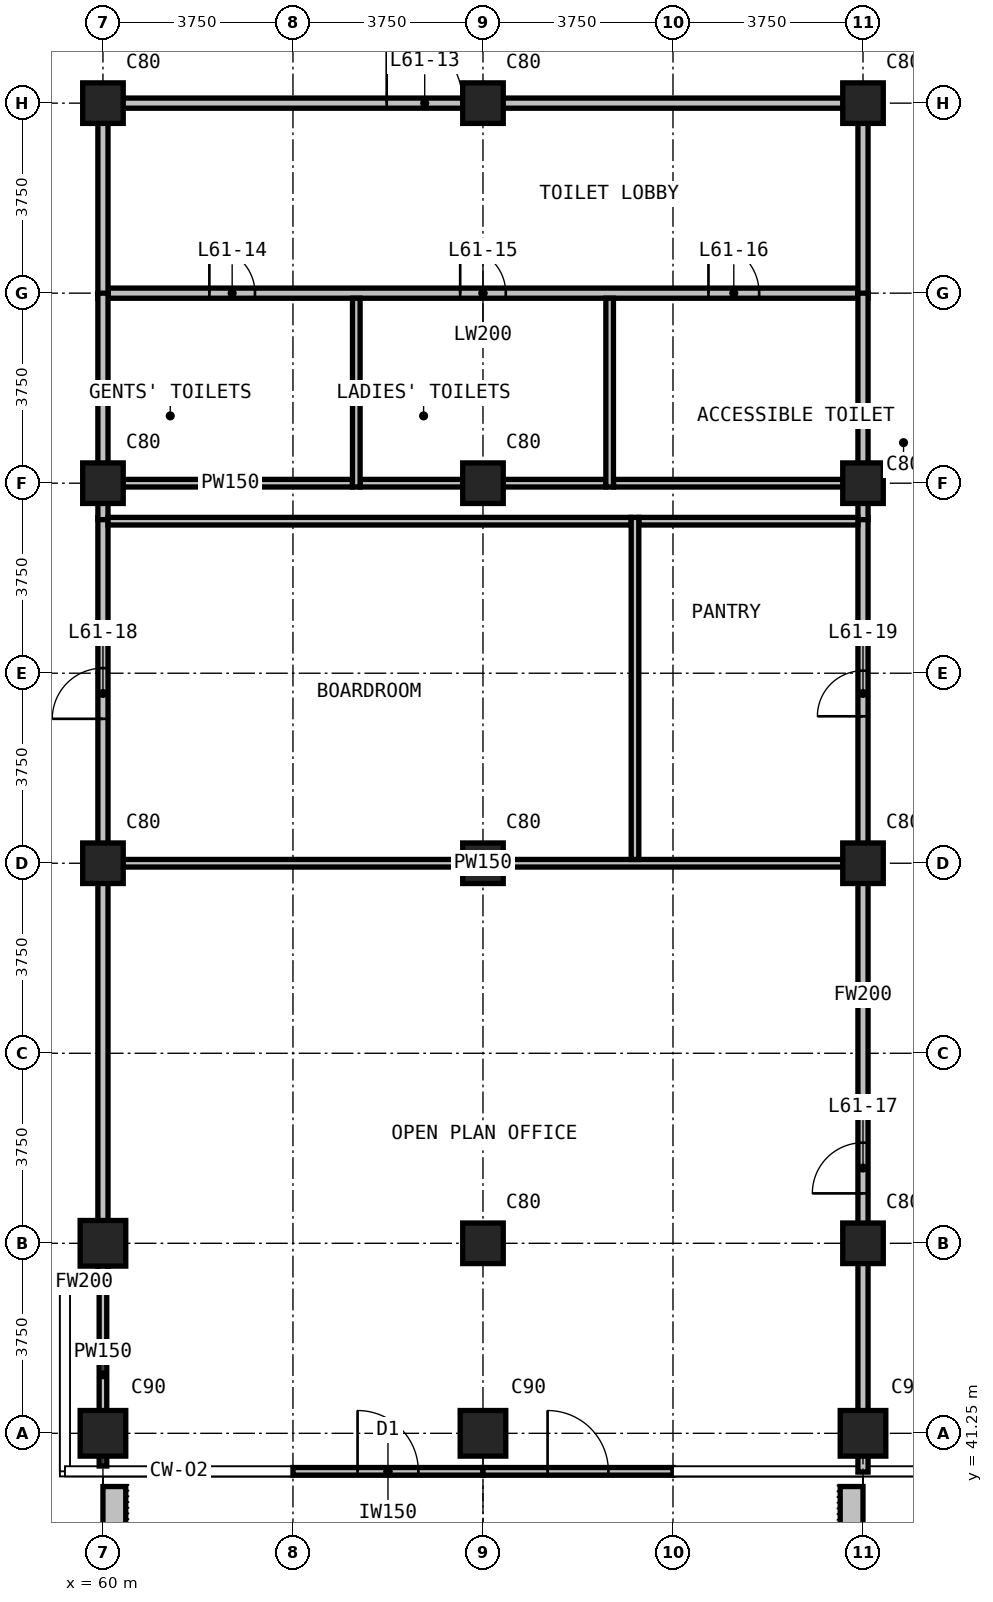
"""IFC4 building model, lengths in metres.
Left out: names, types, materials, properties, quantities, classifications, styles, units other than length and angle.
Written with IfcOpenShell. Run it as: python <this file> out.ifc"""

import sys

from ifc_helpers import new_model, si_unit, direction, frame, frame_2d, origin, origin_2d, place, context, subcontext, project, spatial, rectangle, extrude, element, fill, save


model = new_model("IFC4")
c1 = context("Model", 3, precision=1e-05, world=origin(), true_north=direction((0.0, 1.0)))
c2 = subcontext(c1, "Body", "Model", "MODEL_VIEW")
j1 = project(units=[si_unit("LENGTHUNIT", "METRE"), si_unit("PLANEANGLEUNIT", "RADIAN")], contexts=[c1])
p1 = place(None, origin())
s1 = spatial("IfcSite", under=j1, at=p1, CompositionType="ELEMENT")
p2 = place(p1, origin())
s2 = spatial("IfcBuilding", under=s1, at=p2, CompositionType="ELEMENT")
p3 = place(p2, frame((0.0, 0.0, 235.5)))
s3 = spatial("IfcBuildingStorey", under=s2, at=p3, CompositionType="ELEMENT", Elevation=235.5)
for number, where, z_axis, x_axis in (
    (1, (60.0, 41.25, 0.0), (0.0, 0.0, 1.0), (1.0, 0.0, 0.0)),
    (2, (60.0, 45.0, 0.0), (0.0, 0.0, 1.0), (1.0, 0.0, 0.0)),
):
    element("IfcColumn", number, at=place(p3, frame(where, z_axis=z_axis, x_axis=x_axis)), inside=s3, PredefinedType="COLUMN", context=c2, shape_type="SweptSolid", body=[
        extrude(rectangle(XDim=0.9, YDim=0.9, at=origin_2d()), origin(), (0.0, 0.0, 1.0), 3.6),
    ])
for number, where, z_axis, x_axis in (
    (3, (60.0, 52.5, 0.0), (0.0, 0.0, 1.0), (1.0, 0.0, 0.0)),
    (4, (60.0, 60.0, 0.0), (0.0, 0.0, 1.0), (1.0, 0.0, 0.0)),
    (5, (60.0, 67.5, 0.0), (0.0, 0.0, 1.0), (1.0, 0.0, 0.0)),
):
    element("IfcColumn", number, at=place(p3, frame(where, z_axis=z_axis, x_axis=x_axis)), inside=s3, PredefinedType="COLUMN", context=c2, shape_type="SweptSolid", body=[
        extrude(rectangle(XDim=0.8, YDim=0.8, at=origin_2d()), origin(), (0.0, 0.0, 1.0), 3.6),
    ])
p4 = place(p3, frame((67.5, 41.25, 0.0), z_axis=(0.0, 0.0, 1.0), x_axis=(1.0, 0.0, 0.0)))
e6 = element("IfcColumn", 6, at=p4, inside=s3, PredefinedType="COLUMN", context=c2, shape_type="SweptSolid", body=[
    extrude(rectangle(XDim=0.9, YDim=0.9, at=origin_2d()), origin(), (0.0, 0.0, 1.0), 3.6),
])
for number, where, z_axis, x_axis in (
    (7, (67.5, 45.0, 0.0), (0.0, 0.0, 1.0), (1.0, 0.0, 0.0)),
    (8, (67.5, 52.5, 0.0), (0.0, 0.0, 1.0), (1.0, 0.0, 0.0)),
    (9, (67.5, 60.0, 0.0), (0.0, 0.0, 1.0), (1.0, 0.0, 0.0)),
    (10, (67.5, 67.5, 0.0), (0.0, 0.0, 1.0), (1.0, 0.0, 0.0)),
):
    element("IfcColumn", number, at=place(p3, frame(where, z_axis=z_axis, x_axis=x_axis)), inside=s3, PredefinedType="COLUMN", context=c2, shape_type="SweptSolid", body=[
        extrude(rectangle(XDim=0.8, YDim=0.8, at=origin_2d()), origin(), (0.0, 0.0, 1.0), 3.6),
    ])
p5 = place(p3, frame((75.0, 41.25, 0.0), z_axis=(0.0, 0.0, 1.0), x_axis=(1.0, 0.0, 0.0)))
e11 = element("IfcColumn", 11, at=p5, inside=s3, PredefinedType="COLUMN", context=c2, shape_type="SweptSolid", body=[
    extrude(rectangle(XDim=0.9, YDim=0.9, at=origin_2d()), origin(), (0.0, 0.0, 1.0), 3.6),
])
for number, where, z_axis, x_axis in (
    (12, (75.0, 45.0, 0.0), (0.0, 0.0, 1.0), (1.0, 0.0, 0.0)),
    (13, (75.0, 52.5, 0.0), (0.0, 0.0, 1.0), (1.0, 0.0, 0.0)),
    (14, (75.0, 60.0, 0.0), (0.0, 0.0, 1.0), (1.0, 0.0, 0.0)),
    (15, (75.0, 67.5, 0.0), (0.0, 0.0, 1.0), (1.0, 0.0, 0.0)),
):
    element("IfcColumn", number, at=place(p3, frame(where, z_axis=z_axis, x_axis=x_axis)), inside=s3, PredefinedType="COLUMN", context=c2, shape_type="SweptSolid", body=[
        extrude(rectangle(XDim=0.8, YDim=0.8, at=origin_2d()), origin(), (0.0, 0.0, 1.0), 3.6),
    ])
p6 = place(p3, frame((63.75, 40.5, 0.0), z_axis=(0.0, 0.0, 1.0), x_axis=(1.0, 0.0, 0.0)))
e16 = element("IfcWall", 16, at=p6, inside=s3, PredefinedType="SOLIDWALL", context=c2, shape_type="SweptSolid", body=[
    extrude(rectangle(XDim=3.75, YDim=0.15, at=frame_2d((1.875, 0.0))), origin(), (0.0, 0.0, 1.0), 3.3),
])
p7 = place(p6, frame((1.275, 0.0, 0.0)))
e17 = element("IfcOpeningElement", 17, at=p7, cuts=e16, PredefinedType="OPENING", context=c2, shape_type="SweptSolid", body=[
    extrude(rectangle(XDim=1.2, YDim=2.4, at=frame_2d((0.6, 1.2))), frame((0.0, 0.085, 0.0), z_axis=(0.0, -1.0, 0.0), x_axis=(1.0, 0.0, 0.0)), (0.0, 0.0, 1.0), 0.17),
])
p8 = place(p3, frame((67.5, 40.5, 0.0), z_axis=(0.0, 0.0, 1.0), x_axis=(1.0, 0.0, 0.0)))
e18 = element("IfcWall", 18, at=p8, inside=s3, PredefinedType="SOLIDWALL", context=c2, shape_type="SweptSolid", body=[
    extrude(rectangle(XDim=3.75, YDim=0.15, at=frame_2d((1.875, 0.0))), origin(), (0.0, 0.0, 1.0), 3.3),
])
p9 = place(p8, frame((1.275, 0.0, 0.0)))
e19 = element("IfcOpeningElement", 19, at=p9, cuts=e18, PredefinedType="OPENING", context=c2, shape_type="SweptSolid", body=[
    extrude(rectangle(XDim=1.2, YDim=2.4, at=frame_2d((0.6, 1.2))), frame((0.0, 0.085, 0.0), z_axis=(0.0, -1.0, 0.0), x_axis=(1.0, 0.0, 0.0)), (0.0, 0.0, 1.0), 0.17),
])
for number, where, z_axis, x_axis in (
    (20, (60.225, 40.2, 0.0), (0.0, 0.0, 1.0), (0.0, -1.0, 0.0)),
    (21, (74.775, 40.2, 0.0), (0.0, 0.0, 1.0), (0.0, -1.0, 0.0)),
):
    element("IfcWall", number, at=place(p3, frame(where, z_axis=z_axis, x_axis=x_axis)), inside=s3, PredefinedType="USERDEFINED", context=c2, shape_type="SweptSolid", body=[
        extrude(rectangle(XDim=2.35, YDim=0.45, at=frame_2d((1.175, 0.0))), origin(), (0.0, 0.0, 1.0), 1.1),
    ])
p10 = place(p3, frame((60.1, 63.75, 0.0), z_axis=(0.0, 0.0, 1.0), x_axis=(1.0, 0.0, 0.0)))
e22 = element("IfcWall", 22, at=p10, inside=s3, PredefinedType="PARTITIONING", context=c2, shape_type="SweptSolid", body=[
    extrude(rectangle(XDim=14.8, YDim=0.2, at=frame_2d((7.4, 0.0))), origin(), (0.0, 0.0, 1.0), 3.3),
])
p11 = place(p10, frame((2.0, 0.0, 0.0)))
e23 = element("IfcOpeningElement", 23, at=p11, cuts=e22, PredefinedType="OPENING", context=c2, shape_type="SweptSolid", body=[
    extrude(rectangle(XDim=0.9, YDim=2.2, at=frame_2d((0.45, 1.1))), frame((0.0, 0.11, 0.0), z_axis=(0.0, -1.0, 0.0), x_axis=(1.0, 0.0, 0.0)), (0.0, 0.0, 1.0), 0.22),
])
p12 = place(p10, frame((6.95, 0.0, 0.0)))
e24 = element("IfcOpeningElement", 24, at=p12, cuts=e22, PredefinedType="OPENING", context=c2, shape_type="SweptSolid", body=[
    extrude(rectangle(XDim=0.9, YDim=2.2, at=frame_2d((0.45, 1.1))), frame((0.0, 0.11, 0.0), z_axis=(0.0, -1.0, 0.0), x_axis=(1.0, 0.0, 0.0)), (0.0, 0.0, 1.0), 0.22),
])
p13 = place(p10, frame((11.85, 0.0, 0.0)))
e25 = element("IfcOpeningElement", 25, at=p13, cuts=e22, PredefinedType="OPENING", context=c2, shape_type="SweptSolid", body=[
    extrude(rectangle(XDim=1.0, YDim=2.2, at=frame_2d((0.5, 1.1))), frame((0.0, 0.11, 0.0), z_axis=(0.0, -1.0, 0.0), x_axis=(1.0, 0.0, 0.0)), (0.0, 0.0, 1.0), 0.22),
])
p14 = place(p3, frame((60.1, 67.5, 0.0), z_axis=(0.0, 0.0, 1.0), x_axis=(1.0, 0.0, 0.0)))
e26 = element("IfcWall", 26, at=p14, inside=s3, PredefinedType="PARTITIONING", context=c2, shape_type="SweptSolid", body=[
    extrude(rectangle(XDim=14.8, YDim=0.2, at=frame_2d((7.4, 0.0))), origin(), (0.0, 0.0, 1.0), 3.3),
])
p15 = place(p14, frame((5.5, 0.0, 0.0)))
e27 = element("IfcOpeningElement", 27, at=p15, cuts=e26, PredefinedType="OPENING", context=c2, shape_type="SweptSolid", body=[
    extrude(rectangle(XDim=1.5, YDim=2.2, at=frame_2d((0.75, 1.1))), frame((0.0, 0.11, 0.0), z_axis=(0.0, -1.0, 0.0), x_axis=(1.0, 0.0, 0.0)), (0.0, 0.0, 1.0), 0.22),
])
for number, where, z_axis, x_axis in (
    (28, (60.0, 63.65, 0.0), (0.0, 0.0, 1.0), (0.0, 1.0, 0.0)),
    (29, (75.0, 63.65, 0.0), (0.0, 0.0, 1.0), (0.0, 1.0, 0.0)),
):
    element("IfcWall", number, at=place(p3, frame(where, z_axis=z_axis, x_axis=x_axis)), inside=s3, PredefinedType="PARTITIONING", context=c2, shape_type="SweptSolid", body=[
        extrude(rectangle(XDim=3.95, YDim=0.2, at=frame_2d((1.975, 0.0))), origin(), (0.0, 0.0, 1.0), 3.3),
    ])
p16 = place(p3, frame((59.355, 44.235, 0.0), z_axis=(0.0, 0.0, 1.0), x_axis=(1.0, 0.0, 0.0)))
e30 = element("IfcWall", 30, at=p16, inside=s3, PredefinedType="PARTITIONING", context=c2, shape_type="SweptSolid", body=[
    extrude(rectangle(XDim=0.545, YDim=0.2, at=frame_2d((0.272, 0.0))), origin(), (0.0, 0.0, 1.0), 3.3),
])
p17 = place(p3, frame((60.0, 44.135, 0.0), z_axis=(0.0, 0.0, 1.0), x_axis=(0.0, 1.0, 0.0)))
e31 = element("IfcWall", 31, at=p17, inside=s3, PredefinedType="PARTITIONING", context=c2, shape_type="SweptSolid", body=[
    extrude(rectangle(XDim=15.19, YDim=0.2, at=frame_2d((7.595, 0.0))), origin(), (0.0, 0.0, 1.0), 3.3),
])
p18 = place(p17, frame((11.215, 0.0, 0.0)))
e32 = element("IfcOpeningElement", 32, at=p18, cuts=e31, PredefinedType="OPENING", context=c2, shape_type="SweptSolid", body=[
    extrude(rectangle(XDim=1.0, YDim=2.2, at=frame_2d((0.5, 1.1))), frame((0.0, 0.11, 0.0), z_axis=(0.0, -1.0, 0.0), x_axis=(1.0, 0.0, 0.0)), (0.0, 0.0, 1.0), 0.22),
])
p19 = place(p3, frame((60.0, 59.28, 0.0), z_axis=(0.0, 0.0, 1.0), x_axis=(0.0, 1.0, 0.0)))
e33 = element("IfcWall", 33, at=p19, inside=s3, PredefinedType="PARTITIONING", context=c2, shape_type="SweptSolid", body=[
    extrude(rectangle(XDim=0.795, YDim=0.2, at=frame_2d((0.397, 0.0))), origin(), (0.0, 0.0, 1.0), 3.3),
])
p20 = place(p3, frame((60.0, 60.0, 0.0), z_axis=(0.0, 0.0, 1.0), x_axis=(0.0, 1.0, 0.0)))
e34 = element("IfcWall", 34, at=p20, inside=s3, PredefinedType="PARTITIONING", context=c2, shape_type="SweptSolid", body=[
    extrude(rectangle(XDim=3.75, YDim=0.2, at=frame_2d((1.875, 0.0))), origin(), (0.0, 0.0, 1.0), 3.3),
])
p21 = place(p3, frame((75.0, 40.485, 0.0), z_axis=(0.0, 0.0, 1.0), x_axis=(0.0, 1.0, 0.0)))
e35 = element("IfcWall", 35, at=p21, inside=s3, PredefinedType="PARTITIONING", context=c2, shape_type="SweptSolid", body=[
    extrude(rectangle(XDim=18.84, YDim=0.2, at=frame_2d((9.42, 0.0))), origin(), (0.0, 0.0, 1.0), 3.3),
])
p22 = place(p21, frame((5.5, 0.0, 0.0)))
e36 = element("IfcOpeningElement", 36, at=p22, cuts=e35, PredefinedType="OPENING", context=c2, shape_type="SweptSolid", body=[
    extrude(rectangle(XDim=1.0, YDim=2.2, at=frame_2d((0.5, 1.1))), frame((0.0, 0.11, 0.0), z_axis=(0.0, -1.0, 0.0), x_axis=(1.0, 0.0, 0.0)), (0.0, 0.0, 1.0), 0.22),
])
p23 = place(p21, frame((14.915, 0.0, 0.0)))
e37 = element("IfcOpeningElement", 37, at=p23, cuts=e35, PredefinedType="OPENING", context=c2, shape_type="SweptSolid", body=[
    extrude(rectangle(XDim=0.9, YDim=2.2, at=frame_2d((0.45, 1.1))), frame((0.0, 0.11, 0.0), z_axis=(0.0, -1.0, 0.0), x_axis=(1.0, 0.0, 0.0)), (0.0, 0.0, 1.0), 0.22),
])
p24 = place(p3, frame((75.0, 59.28, 0.0), z_axis=(0.0, 0.0, 1.0), x_axis=(0.0, 1.0, 0.0)))
e38 = element("IfcWall", 38, at=p24, inside=s3, PredefinedType="PARTITIONING", context=c2, shape_type="SweptSolid", body=[
    extrude(rectangle(XDim=0.795, YDim=0.2, at=frame_2d((0.397, 0.0))), origin(), (0.0, 0.0, 1.0), 3.3),
])
p25 = place(p3, frame((75.0, 60.0, 0.0), z_axis=(0.0, 0.0, 1.0), x_axis=(0.0, 1.0, 0.0)))
e39 = element("IfcWall", 39, at=p25, inside=s3, PredefinedType="PARTITIONING", context=c2, shape_type="SweptSolid", body=[
    extrude(rectangle(XDim=3.75, YDim=0.2, at=frame_2d((1.875, 0.0))), origin(), (0.0, 0.0, 1.0), 3.3),
])
p26 = place(p3, frame((60.1, 52.5, 0.0), z_axis=(0.0, 0.0, 1.0), x_axis=(1.0, 0.0, 0.0)))
e40 = element("IfcWall", 40, at=p26, inside=s3, PredefinedType="PARTITIONING", context=c2, shape_type="SweptSolid", body=[
    extrude(rectangle(XDim=14.8, YDim=0.15, at=frame_2d((7.4, 0.0))), origin(), (0.0, 0.0, 1.0), 3.3),
])
p27 = place(p3, frame((60.1, 59.25, 0.0), z_axis=(0.0, 0.0, 1.0), x_axis=(1.0, 0.0, 0.0)))
e41 = element("IfcWall", 41, at=p27, inside=s3, PredefinedType="PARTITIONING", context=c2, shape_type="SweptSolid", body=[
    extrude(rectangle(XDim=10.325, YDim=0.15, at=frame_2d((5.163, 0.0))), origin(), (0.0, 0.0, 1.0), 3.3),
])
p28 = place(p3, frame((70.575, 59.25, 0.0), z_axis=(0.0, 0.0, 1.0), x_axis=(1.0, 0.0, 0.0)))
e42 = element("IfcWall", 42, at=p28, inside=s3, PredefinedType="PARTITIONING", context=c2, shape_type="SweptSolid", body=[
    extrude(rectangle(XDim=4.325, YDim=0.15, at=frame_2d((2.163, 0.0))), origin(), (0.0, 0.0, 1.0), 3.3),
])
p29 = place(p3, frame((60.1, 60.0, 0.0), z_axis=(0.0, 0.0, 1.0), x_axis=(1.0, 0.0, 0.0)))
e43 = element("IfcWall", 43, at=p29, inside=s3, PredefinedType="PARTITIONING", context=c2, shape_type="SweptSolid", body=[
    extrude(rectangle(XDim=4.825, YDim=0.15, at=frame_2d((2.413, 0.0))), origin(), (0.0, 0.0, 1.0), 3.3),
])
p30 = place(p3, frame((65.075, 60.0, 0.0), z_axis=(0.0, 0.0, 1.0), x_axis=(1.0, 0.0, 0.0)))
e44 = element("IfcWall", 44, at=p30, inside=s3, PredefinedType="PARTITIONING", context=c2, shape_type="SweptSolid", body=[
    extrude(rectangle(XDim=4.85, YDim=0.15, at=frame_2d((2.425, 0.0))), origin(), (0.0, 0.0, 1.0), 3.3),
])
p31 = place(p3, frame((70.075, 60.0, 0.0), z_axis=(0.0, 0.0, 1.0), x_axis=(1.0, 0.0, 0.0)))
e45 = element("IfcWall", 45, at=p31, inside=s3, PredefinedType="PARTITIONING", context=c2, shape_type="SweptSolid", body=[
    extrude(rectangle(XDim=4.825, YDim=0.15, at=frame_2d((2.413, 0.0))), origin(), (0.0, 0.0, 1.0), 3.3),
])
p32 = place(p3, frame((60.0, 40.605, 0.0), z_axis=(0.0, 0.0, 1.0), x_axis=(0.0, 1.0, 0.0)))
e46 = element("IfcWall", 46, at=p32, inside=s3, PredefinedType="PARTITIONING", context=c2, shape_type="SweptSolid", body=[
    extrude(rectangle(XDim=3.6, YDim=0.15, at=frame_2d((1.8, 0.0))), origin(), (0.0, 0.0, 1.0), 3.3),
])
for number, where, z_axis, x_axis in (
    (47, (65.0, 59.925, 0.0), (0.0, 0.0, 1.0), (0.0, 1.0, 0.0)),
    (48, (70.0, 59.925, 0.0), (0.0, 0.0, 1.0), (0.0, 1.0, 0.0)),
):
    element("IfcWall", number, at=place(p3, frame(where, z_axis=z_axis, x_axis=x_axis)), inside=s3, PredefinedType="PARTITIONING", context=c2, shape_type="SweptSolid", body=[
        extrude(rectangle(XDim=3.725, YDim=0.15, at=frame_2d((1.862, 0.0))), origin(), (0.0, 0.0, 1.0), 3.3),
    ])
p33 = place(p3, frame((70.5, 52.575, 0.0), z_axis=(0.0, 0.0, 1.0), x_axis=(0.0, 1.0, 0.0)))
e49 = element("IfcWall", 49, at=p33, inside=s3, PredefinedType="PARTITIONING", context=c2, shape_type="SweptSolid", body=[
    extrude(rectangle(XDim=6.75, YDim=0.15, at=frame_2d((3.375, 0.0))), origin(), (0.0, 0.0, 1.0), 3.3),
])
p34 = place(p7, origin())
e50 = element("IfcDoor", 50, at=p34, inside=s3, OperationType="SINGLE_SWING_LEFT", PredefinedType="DOOR", context=c2, shape_type="SweptSolid", body=[
    extrude(rectangle(XDim=1.2, YDim=2.4, at=frame_2d((0.6, 1.2))), frame((0.0, 0.025, 0.0), z_axis=(0.0, -1.0, 0.0), x_axis=(1.0, 0.0, 0.0)), (0.0, 0.0, 1.0), 0.05),
])
fill(e17, e50)
p35 = place(p9, origin())
e51 = element("IfcDoor", 51, at=p35, inside=s3, OperationType="SINGLE_SWING_LEFT", PredefinedType="DOOR", context=c2, shape_type="SweptSolid", body=[
    extrude(rectangle(XDim=1.2, YDim=2.4, at=frame_2d((0.6, 1.2))), frame((0.0, 0.025, 0.0), z_axis=(0.0, -1.0, 0.0), x_axis=(1.0, 0.0, 0.0)), (0.0, 0.0, 1.0), 0.05),
])
fill(e19, e51)
p36 = place(p15, origin())
e52 = element("IfcDoor", 52, at=p36, inside=s3, OperationType="DOUBLE_DOOR_SINGLE_SWING", PredefinedType="DOOR", context=c2, shape_type="SweptSolid", body=[
    extrude(rectangle(XDim=1.5, YDim=2.2, at=frame_2d((0.75, 1.1))), frame((0.0, 0.025, 0.0), z_axis=(0.0, -1.0, 0.0), x_axis=(1.0, 0.0, 0.0)), (0.0, 0.0, 1.0), 0.05),
])
fill(e27, e52)
p37 = place(p11, origin())
e53 = element("IfcDoor", 53, at=p37, inside=s3, OperationType="SINGLE_SWING_LEFT", PredefinedType="DOOR", context=c2, shape_type="SweptSolid", body=[
    extrude(rectangle(XDim=0.9, YDim=2.2, at=frame_2d((0.45, 1.1))), frame((0.0, 0.025, 0.0), z_axis=(0.0, -1.0, 0.0), x_axis=(1.0, 0.0, 0.0)), (0.0, 0.0, 1.0), 0.05),
])
fill(e23, e53)
p38 = place(p12, origin())
e54 = element("IfcDoor", 54, at=p38, inside=s3, OperationType="SINGLE_SWING_RIGHT", PredefinedType="DOOR", context=c2, shape_type="SweptSolid", body=[
    extrude(rectangle(XDim=0.9, YDim=2.2, at=frame_2d((0.45, 1.1))), frame((0.0, 0.025, 0.0), z_axis=(0.0, -1.0, 0.0), x_axis=(1.0, 0.0, 0.0)), (0.0, 0.0, 1.0), 0.05),
])
fill(e24, e54)
p39 = place(p13, origin())
e55 = element("IfcDoor", 55, at=p39, inside=s3, OperationType="SINGLE_SWING_RIGHT", PredefinedType="DOOR", context=c2, shape_type="SweptSolid", body=[
    extrude(rectangle(XDim=1.0, YDim=2.2, at=frame_2d((0.5, 1.1))), frame((0.0, 0.025, 0.0), z_axis=(0.0, -1.0, 0.0), x_axis=(1.0, 0.0, 0.0)), (0.0, 0.0, 1.0), 0.05),
])
fill(e25, e55)
p40 = place(p22, origin())
e56 = element("IfcDoor", 56, at=p40, inside=s3, OperationType="SINGLE_SWING_RIGHT", PredefinedType="DOOR", context=c2, shape_type="SweptSolid", body=[
    extrude(rectangle(XDim=1.0, YDim=2.2, at=frame_2d((0.5, 1.1))), frame((0.0, 0.025, 0.0), z_axis=(0.0, -1.0, 0.0), x_axis=(1.0, 0.0, 0.0)), (0.0, 0.0, 1.0), 0.05),
])
fill(e36, e56)
p41 = place(p18, origin())
e57 = element("IfcDoor", 57, at=p41, inside=s3, OperationType="SINGLE_SWING_LEFT", PredefinedType="DOOR", context=c2, shape_type="SweptSolid", body=[
    extrude(rectangle(XDim=1.0, YDim=2.2, at=frame_2d((0.5, 1.1))), frame((0.0, 0.025, 0.0), z_axis=(0.0, -1.0, 0.0), x_axis=(1.0, 0.0, 0.0)), (0.0, 0.0, 1.0), 0.05),
])
fill(e32, e57)
p42 = place(p23, origin())
e58 = element("IfcDoor", 58, at=p42, inside=s3, OperationType="SINGLE_SWING_LEFT", PredefinedType="DOOR", context=c2, shape_type="SweptSolid", body=[
    extrude(rectangle(XDim=0.9, YDim=2.2, at=frame_2d((0.45, 1.1))), frame((0.0, 0.025, 0.0), z_axis=(0.0, -1.0, 0.0), x_axis=(1.0, 0.0, 0.0)), (0.0, 0.0, 1.0), 0.05),
])
fill(e37, e58)
save(model, sys.argv[1])
